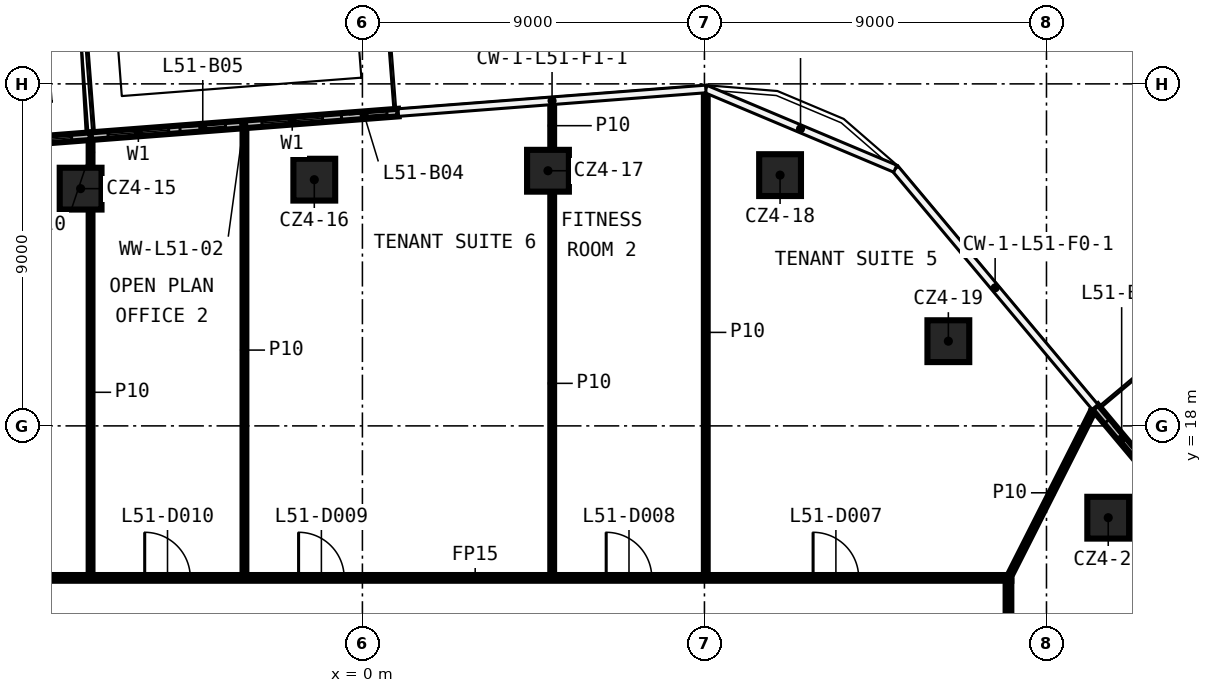
"""IFC4 building model, lengths in metres.
Left out: names, types, materials, properties, quantities, classifications, styles, units other than length and angle.
Written with IfcOpenShell. Run it as: python <this file> out.ifc"""

import sys

from ifc_helpers import new_model, si_unit, direction, frame, frame_2d, origin, origin_2d, place, context, subcontext, project, spatial, rectangle, extrude, element, fill, save


model = new_model("IFC4")
c1 = context("Model", 3, precision=1e-05, world=origin(), true_north=direction((0.0, 1.0)))
c2 = subcontext(c1, "Body", "Model", "MODEL_VIEW")
j1 = project(units=[si_unit("LENGTHUNIT", "METRE"), si_unit("PLANEANGLEUNIT", "RADIAN")], contexts=[c1])
p1 = place(None, origin())
s1 = spatial("IfcSite", under=j1, at=p1, CompositionType="ELEMENT")
p2 = place(p1, origin())
s2 = spatial("IfcBuilding", under=s1, at=p2, CompositionType="ELEMENT")
p3 = place(p2, frame((0.0, 0.0, 245.4)))
s3 = spatial("IfcBuildingStorey", under=s2, at=p3, CompositionType="ELEMENT", Elevation=245.4)
for number, where, z_axis, x_axis in (
    (1, (-7.415, 24.243, 0.0), (0.0, 0.0, 1.0), (1.0, 0.0, 0.0)),
    (2, (-1.266, 24.479, 0.0), (0.0, 0.0, 1.0), (1.0, 0.0, 0.0)),
    (3, (4.883, 24.714, 0.0), (0.0, 0.0, 1.0), (1.0, 0.0, 0.0)),
    (4, (10.99, 24.599, 0.0), (0.0, 0.0, 1.0), (1.0, 0.0, 0.0)),
    (5, (15.418, 20.229, 0.0), (0.0, 0.0, 1.0), (1.0, 0.0, 0.0)),
    (6, (19.625, 15.584, 0.0), (0.0, 0.0, 1.0), (1.0, 0.0, 0.0)),
):
    element("IfcColumn", number, at=place(p3, frame(where, z_axis=z_axis, x_axis=x_axis)), inside=s3, PredefinedType="COLUMN", context=c2, shape_type="SweptSolid", body=[
        extrude(rectangle(XDim=1.1, YDim=1.1, at=origin_2d()), origin(), (0.0, 0.0, 1.0), 3.82),
    ])
p4 = place(p3, frame((-9.075, 14.0, 0.0), z_axis=(0.0, 0.0, 1.0), x_axis=(1.0, 0.0, 0.0)))
e7 = element("IfcWall", 7, at=p4, inside=s3, PredefinedType="PARTITIONING", context=c2, shape_type="SweptSolid", body=[
    extrude(rectangle(XDim=26.15, YDim=0.15, at=frame_2d((13.075, 0.0))), origin(), (0.0, 0.0, 1.0), 3.82),
])
p5 = place(p4, frame((20.934, 0.0, 0.0)))
e8 = element("IfcOpeningElement", 8, at=p5, cuts=e7, PredefinedType="OPENING", context=c2, shape_type="SweptSolid", body=[
    extrude(rectangle(XDim=1.2, YDim=2.1, at=frame_2d((0.6, 1.05))), frame((0.0, 0.085, 0.0), z_axis=(0.0, -1.0, 0.0), x_axis=(1.0, 0.0, 0.0)), (0.0, 0.0, 1.0), 0.17),
])
p6 = place(p4, frame((15.49, 0.0, 0.0)))
e9 = element("IfcOpeningElement", 9, at=p6, cuts=e7, PredefinedType="OPENING", context=c2, shape_type="SweptSolid", body=[
    extrude(rectangle(XDim=1.2, YDim=2.1, at=frame_2d((0.6, 1.05))), frame((0.0, 0.085, 0.0), z_axis=(0.0, -1.0, 0.0), x_axis=(1.0, 0.0, 0.0)), (0.0, 0.0, 1.0), 0.17),
])
p7 = place(p4, frame((7.396, 0.0, 0.0)))
e10 = element("IfcOpeningElement", 10, at=p7, cuts=e7, PredefinedType="OPENING", context=c2, shape_type="SweptSolid", body=[
    extrude(rectangle(XDim=1.2, YDim=2.1, at=frame_2d((0.6, 1.05))), frame((0.0, 0.085, 0.0), z_axis=(0.0, -1.0, 0.0), x_axis=(1.0, 0.0, 0.0)), (0.0, 0.0, 1.0), 0.17),
])
p8 = place(p4, frame((3.346, 0.0, 0.0)))
e11 = element("IfcOpeningElement", 11, at=p8, cuts=e7, PredefinedType="OPENING", context=c2, shape_type="SweptSolid", body=[
    extrude(rectangle(XDim=1.2, YDim=2.1, at=frame_2d((0.6, 1.05))), frame((0.0, 0.085, 0.0), z_axis=(0.0, -1.0, 0.0), x_axis=(1.0, 0.0, 0.0)), (0.0, 0.0, 1.0), 0.17),
])
p9 = place(p3, frame((17.0, 14.0, 0.0), z_axis=(0.0, 0.0, 1.0), x_axis=(0.451643796449, 0.892198341811, 0.0)))
e12 = element("IfcWall", 12, at=p9, inside=s3, PredefinedType="PARTITIONING", context=c2, shape_type="SweptSolid", body=[
    extrude(rectangle(XDim=5.02, YDim=0.1, at=frame_2d((2.51, 0.0))), origin(), (0.0, 0.0, 1.0), 3.82),
])
p10 = place(p3, frame((17.0, 13.925, 0.0), z_axis=(0.0, 0.0, 1.0), x_axis=(0.0, -1.0, 0.0)))
e13 = element("IfcWall", 13, at=p10, inside=s3, PredefinedType="PARTITIONING", context=c2, shape_type="SweptSolid", body=[
    extrude(rectangle(XDim=27.85, YDim=0.15, at=frame_2d((13.925, 0.0))), origin(), (0.0, 0.0, 1.0), 3.82),
])
p11 = place(p10, frame((16.802, 0.0, 0.0)))
e14 = element("IfcOpeningElement", 14, at=p11, cuts=e13, PredefinedType="OPENING", context=c2, shape_type="SweptSolid", body=[
    extrude(rectangle(XDim=1.2, YDim=2.1, at=frame_2d((0.6, 1.05))), frame((0.0, 0.085, 0.0), z_axis=(0.0, -1.0, 0.0), x_axis=(1.0, 0.0, 0.0)), (0.0, 0.0, 1.0), 0.17),
])
p12 = place(p10, frame((12.534, 0.0, 0.0)))
e15 = element("IfcOpeningElement", 15, at=p12, cuts=e13, PredefinedType="OPENING", context=c2, shape_type="SweptSolid", body=[
    extrude(rectangle(XDim=1.2, YDim=2.1, at=frame_2d((0.6, 1.05))), frame((0.0, 0.085, 0.0), z_axis=(0.0, -1.0, 0.0), x_axis=(1.0, 0.0, 0.0)), (0.0, 0.0, 1.0), 0.17),
])
p13 = place(p3, frame((9.035, 14.075, 0.0), z_axis=(0.0, 0.0, 1.0), x_axis=(0.0, 1.0, 0.0)))
e16 = element("IfcWall", 16, at=p13, inside=s3, PredefinedType="PARTITIONING", context=c2, shape_type="SweptSolid", body=[
    extrude(rectangle(XDim=12.771, YDim=0.1, at=frame_2d((6.385, 0.0))), origin(), (0.0, 0.0, 1.0), 3.82),
])
p14 = place(p3, frame((4.994, 14.075, 0.0), z_axis=(0.0, 0.0, 1.0), x_axis=(0.0, 1.0, 0.0)))
e17 = element("IfcWall", 17, at=p14, inside=s3, PredefinedType="PARTITIONING", context=c2, shape_type="SweptSolid", body=[
    extrude(rectangle(XDim=10.089, YDim=0.1, at=frame_2d((5.044, 0.0))), origin(), (0.0, 0.0, 1.0), 3.82),
])
p15 = place(p3, frame((4.994, 25.264, 0.0), z_axis=(0.0, 0.0, 1.0), x_axis=(0.0, 1.0, 0.0)))
e18 = element("IfcWall", 18, at=p15, inside=s3, PredefinedType="PARTITIONING", context=c2, shape_type="SweptSolid", body=[
    extrude(rectangle(XDim=1.272, YDim=0.1, at=frame_2d((0.636, 0.0))), origin(), (0.0, 0.0, 1.0), 3.82),
])
p16 = place(p3, frame((-3.104, 14.075, 0.0), z_axis=(0.0, 0.0, 1.0), x_axis=(0.0, 1.0, 0.0)))
e19 = element("IfcWall", 19, at=p16, inside=s3, PredefinedType="PARTITIONING", context=c2, shape_type="SweptSolid", body=[
    extrude(rectangle(XDim=11.839, YDim=0.1, at=frame_2d((5.92, 0.0))), origin(), (0.0, 0.0, 1.0), 3.82),
])
p17 = place(p3, frame((-7.153, 14.075, 0.0), z_axis=(0.0, 0.0, 1.0), x_axis=(0.0, 1.0, 0.0)))
e20 = element("IfcWall", 20, at=p17, inside=s3, PredefinedType="PARTITIONING", context=c2, shape_type="SweptSolid", body=[
    extrude(rectangle(XDim=9.618, YDim=0.1, at=frame_2d((4.809, 0.0))), origin(), (0.0, 0.0, 1.0), 3.82),
])
p18 = place(p3, frame((-7.153, 24.793, 0.0), z_axis=(0.0, 0.0, 1.0), x_axis=(0.0, 1.0, 0.0)))
e21 = element("IfcWall", 21, at=p18, inside=s3, PredefinedType="PARTITIONING", context=c2, shape_type="SweptSolid", body=[
    extrude(rectangle(XDim=0.811, YDim=0.1, at=frame_2d((0.405, 0.0))), origin(), (0.0, 0.0, 1.0), 3.82),
])
p19 = place(p3, frame((27.162, 9.091, 0.0), z_axis=(0.0, 0.0, 1.0), x_axis=(-0.642398297857, 0.766370946025, 0.0)))
e22 = element("IfcWall", 22, at=p19, inside=s3, PredefinedType="SOLIDWALL", context=c2, shape_type="SweptSolid", body=[
    extrude(rectangle(XDim=12.275, YDim=0.2, at=frame_2d((6.137, 0.0))), origin(), (0.0, 0.0, 1.0), 3.82),
])
p20 = place(p19, frame((2.0, 0.0, 0.6)))
e23 = element("IfcOpeningElement", 23, at=p20, cuts=e22, PredefinedType="OPENING", context=c2, shape_type="SweptSolid", body=[
    extrude(rectangle(XDim=1.6, YDim=2.4, at=frame_2d((0.8, 1.2))), frame((0.0, 0.11, 0.0), z_axis=(0.0, -1.0, 0.0), x_axis=(1.0, 0.0, 0.0)), (0.0, 0.0, 1.0), 0.22),
])
p21 = place(p19, frame((0.5, 0.0, 0.0)))
e24 = element("IfcOpeningElement", 24, at=p21, cuts=e22, PredefinedType="OPENING", context=c2, shape_type="SweptSolid", body=[
    extrude(rectangle(XDim=1.2, YDim=2.4, at=frame_2d((0.6, 1.2))), frame((0.0, 0.11, 0.0), z_axis=(0.0, -1.0, 0.0), x_axis=(1.0, 0.0, 0.0)), (0.0, 0.0, 1.0), 0.22),
])
p22 = place(p19, frame((6.092, 0.0, 0.6)))
e25 = element("IfcOpeningElement", 25, at=p22, cuts=e22, PredefinedType="OPENING", context=c2, shape_type="SweptSolid", body=[
    extrude(rectangle(XDim=1.6, YDim=2.4, at=frame_2d((0.8, 1.2))), frame((0.0, 0.11, 0.0), z_axis=(0.0, -1.0, 0.0), x_axis=(1.0, 0.0, 0.0)), (0.0, 0.0, 1.0), 0.22),
])
p23 = place(p19, frame((4.592, 0.0, 0.0)))
e26 = element("IfcOpeningElement", 26, at=p23, cuts=e22, PredefinedType="OPENING", context=c2, shape_type="SweptSolid", body=[
    extrude(rectangle(XDim=1.2, YDim=2.4, at=frame_2d((0.6, 1.2))), frame((0.0, 0.11, 0.0), z_axis=(0.0, -1.0, 0.0), x_axis=(1.0, 0.0, 0.0)), (0.0, 0.0, 1.0), 0.22),
])
p24 = place(p19, frame((8.683, 0.0, 0.6)))
e27 = element("IfcOpeningElement", 27, at=p24, cuts=e22, PredefinedType="OPENING", context=c2, shape_type="SweptSolid", body=[
    extrude(rectangle(XDim=1.6, YDim=2.4, at=frame_2d((0.8, 1.2))), frame((0.0, 0.11, 0.0), z_axis=(0.0, -1.0, 0.0), x_axis=(1.0, 0.0, 0.0)), (0.0, 0.0, 1.0), 0.22),
])
p25 = place(p19, frame((10.583, 0.0, 0.0)))
e28 = element("IfcOpeningElement", 28, at=p25, cuts=e22, PredefinedType="OPENING", context=c2, shape_type="SweptSolid", body=[
    extrude(rectangle(XDim=1.2, YDim=2.4, at=frame_2d((0.6, 1.2))), frame((0.0, 0.11, 0.0), z_axis=(0.0, -1.0, 0.0), x_axis=(1.0, 0.0, 0.0)), (0.0, 0.0, 1.0), 0.22),
])
p26 = place(p3, frame((0.945, 26.245, 0.0), z_axis=(0.0, 0.0, 1.0), x_axis=(-0.997069496045, -0.076501111469, 0.0)))
e29 = element("IfcWall", 29, at=p26, inside=s3, PredefinedType="SOLIDWALL", context=c2, shape_type="SweptSolid", body=[
    extrude(rectangle(XDim=8.122, YDim=0.2, at=frame_2d((4.061, 0.0))), origin(), (0.0, 0.0, 1.0), 3.82),
])
p27 = place(p26, frame((2.0, 0.0, 0.6)))
e30 = element("IfcOpeningElement", 30, at=p27, cuts=e29, PredefinedType="OPENING", context=c2, shape_type="SweptSolid", body=[
    extrude(rectangle(XDim=1.6, YDim=2.4, at=frame_2d((0.8, 1.2))), frame((0.0, 0.11, 0.0), z_axis=(0.0, -1.0, 0.0), x_axis=(1.0, 0.0, 0.0)), (0.0, 0.0, 1.0), 0.22),
])
p28 = place(p26, frame((0.3, 0.0, 0.0)))
e31 = element("IfcOpeningElement", 31, at=p28, cuts=e29, PredefinedType="OPENING", context=c2, shape_type="SweptSolid", body=[
    extrude(rectangle(XDim=1.2, YDim=2.4, at=frame_2d((0.6, 1.2))), frame((0.0, 0.11, 0.0), z_axis=(0.0, -1.0, 0.0), x_axis=(1.0, 0.0, 0.0)), (0.0, 0.0, 1.0), 0.22),
])
p29 = place(p26, frame((6.061, 0.0, 0.6)))
e32 = element("IfcOpeningElement", 32, at=p29, cuts=e29, PredefinedType="OPENING", context=c2, shape_type="SweptSolid", body=[
    extrude(rectangle(XDim=1.6, YDim=2.4, at=frame_2d((0.8, 1.2))), frame((0.0, 0.11, 0.0), z_axis=(0.0, -1.0, 0.0), x_axis=(1.0, 0.0, 0.0)), (0.0, 0.0, 1.0), 0.22),
])
p30 = place(p26, frame((4.561, 0.0, 0.0)))
e33 = element("IfcOpeningElement", 33, at=p30, cuts=e29, PredefinedType="OPENING", context=c2, shape_type="SweptSolid", body=[
    extrude(rectangle(XDim=1.2, YDim=2.4, at=frame_2d((0.6, 1.2))), frame((0.0, 0.11, 0.0), z_axis=(0.0, -1.0, 0.0), x_axis=(1.0, 0.0, 0.0)), (0.0, 0.0, 1.0), 0.22),
])
p31 = place(p3, frame((-7.153, 25.624, 0.0), z_axis=(0.0, 0.0, 1.0), x_axis=(-0.997068643963, -0.076512216183, 0.0)))
e34 = element("IfcWall", 34, at=p31, inside=s3, PredefinedType="SOLIDWALL", context=c2, shape_type="SweptSolid", body=[
    extrude(rectangle(XDim=4.052, YDim=0.2, at=frame_2d((2.026, 0.0))), origin(), (0.0, 0.0, 1.0), 3.82),
])
p32 = place(p31, frame((0.5, 0.0, 0.6)))
e35 = element("IfcOpeningElement", 35, at=p32, cuts=e34, PredefinedType="OPENING", context=c2, shape_type="SweptSolid", body=[
    extrude(rectangle(XDim=1.6, YDim=2.4, at=frame_2d((0.8, 1.2))), frame((0.0, 0.11, 0.0), z_axis=(0.0, -1.0, 0.0), x_axis=(1.0, 0.0, 0.0)), (0.0, 0.0, 1.0), 0.22),
])
p33 = place(p31, frame((2.4, 0.0, 0.0)))
e36 = element("IfcOpeningElement", 36, at=p33, cuts=e34, PredefinedType="OPENING", context=c2, shape_type="SweptSolid", body=[
    extrude(rectangle(XDim=1.2, YDim=2.4, at=frame_2d((0.6, 1.2))), frame((0.0, 0.11, 0.0), z_axis=(0.0, -1.0, 0.0), x_axis=(1.0, 0.0, 0.0)), (0.0, 0.0, 1.0), 0.22),
])
p34 = place(p5, origin())
e37 = element("IfcDoor", 37, at=p34, inside=s3, OperationType="SINGLE_SWING_RIGHT", PredefinedType="DOOR", context=c2, shape_type="SweptSolid", body=[
    extrude(rectangle(XDim=1.2, YDim=2.1, at=frame_2d((0.6, 1.05))), frame((0.0, 0.025, 0.0), z_axis=(0.0, -1.0, 0.0), x_axis=(1.0, 0.0, 0.0)), (0.0, 0.0, 1.0), 0.05),
])
fill(e8, e37)
p35 = place(p6, origin())
e38 = element("IfcDoor", 38, at=p35, inside=s3, OperationType="SINGLE_SWING_LEFT", PredefinedType="DOOR", context=c2, shape_type="SweptSolid", body=[
    extrude(rectangle(XDim=1.2, YDim=2.1, at=frame_2d((0.6, 1.05))), frame((0.0, 0.025, 0.0), z_axis=(0.0, -1.0, 0.0), x_axis=(1.0, 0.0, 0.0)), (0.0, 0.0, 1.0), 0.05),
])
fill(e9, e38)
p36 = place(p7, origin())
e39 = element("IfcDoor", 39, at=p36, inside=s3, OperationType="SINGLE_SWING_RIGHT", PredefinedType="DOOR", context=c2, shape_type="SweptSolid", body=[
    extrude(rectangle(XDim=1.2, YDim=2.1, at=frame_2d((0.6, 1.05))), frame((0.0, 0.025, 0.0), z_axis=(0.0, -1.0, 0.0), x_axis=(1.0, 0.0, 0.0)), (0.0, 0.0, 1.0), 0.05),
])
fill(e10, e39)
p37 = place(p8, origin())
e40 = element("IfcDoor", 40, at=p37, inside=s3, OperationType="SINGLE_SWING_LEFT", PredefinedType="DOOR", context=c2, shape_type="SweptSolid", body=[
    extrude(rectangle(XDim=1.2, YDim=2.1, at=frame_2d((0.6, 1.05))), frame((0.0, 0.025, 0.0), z_axis=(0.0, -1.0, 0.0), x_axis=(1.0, 0.0, 0.0)), (0.0, 0.0, 1.0), 0.05),
])
fill(e11, e40)
p38 = place(p25, origin())
e41 = element("IfcDoor", 41, at=p38, inside=s3, OperationType="SLIDING_TO_LEFT", PredefinedType="DOOR", context=c2, shape_type="SweptSolid", body=[
    extrude(rectangle(XDim=1.2, YDim=2.4, at=frame_2d((0.6, 1.2))), frame((0.0, 0.025, 0.0), z_axis=(0.0, -1.0, 0.0), x_axis=(1.0, 0.0, 0.0)), (0.0, 0.0, 1.0), 0.05),
])
fill(e28, e41)
p39 = place(p27, origin())
e42 = element("IfcWindow", 42, at=p39, inside=s3, PartitioningType="SINGLE_PANEL", PredefinedType="WINDOW", context=c2, shape_type="SweptSolid", body=[
    extrude(rectangle(XDim=1.6, YDim=2.4, at=frame_2d((0.8, 1.2))), frame((0.0, 0.03, 0.0), z_axis=(0.0, -1.0, 0.0), x_axis=(1.0, 0.0, 0.0)), (0.0, 0.0, 1.0), 0.06),
])
fill(e30, e42)
p40 = place(p28, origin())
e43 = element("IfcDoor", 43, at=p40, inside=s3, OperationType="SLIDING_TO_LEFT", PredefinedType="DOOR", context=c2, shape_type="SweptSolid", body=[
    extrude(rectangle(XDim=1.2, YDim=2.4, at=frame_2d((0.6, 1.2))), frame((0.0, 0.025, 0.0), z_axis=(0.0, -1.0, 0.0), x_axis=(1.0, 0.0, 0.0)), (0.0, 0.0, 1.0), 0.05),
])
fill(e31, e43)
p41 = place(p29, origin())
e44 = element("IfcWindow", 44, at=p41, inside=s3, PartitioningType="SINGLE_PANEL", PredefinedType="WINDOW", context=c2, shape_type="SweptSolid", body=[
    extrude(rectangle(XDim=1.6, YDim=2.4, at=frame_2d((0.8, 1.2))), frame((0.0, 0.03, 0.0), z_axis=(0.0, -1.0, 0.0), x_axis=(1.0, 0.0, 0.0)), (0.0, 0.0, 1.0), 0.06),
])
fill(e32, e44)
p42 = place(p30, origin())
e45 = element("IfcDoor", 45, at=p42, inside=s3, OperationType="SLIDING_TO_LEFT", PredefinedType="DOOR", context=c2, shape_type="SweptSolid", body=[
    extrude(rectangle(XDim=1.2, YDim=2.4, at=frame_2d((0.6, 1.2))), frame((0.0, 0.025, 0.0), z_axis=(0.0, -1.0, 0.0), x_axis=(1.0, 0.0, 0.0)), (0.0, 0.0, 1.0), 0.05),
])
fill(e33, e45)
p43 = place(p32, origin())
e46 = element("IfcWindow", 46, at=p43, inside=s3, PartitioningType="SINGLE_PANEL", PredefinedType="WINDOW", context=c2, shape_type="SweptSolid", body=[
    extrude(rectangle(XDim=1.6, YDim=2.4, at=frame_2d((0.8, 1.2))), frame((0.0, 0.03, 0.0), z_axis=(0.0, -1.0, 0.0), x_axis=(1.0, 0.0, 0.0)), (0.0, 0.0, 1.0), 0.06),
])
fill(e35, e46)
save(model, sys.argv[1])
